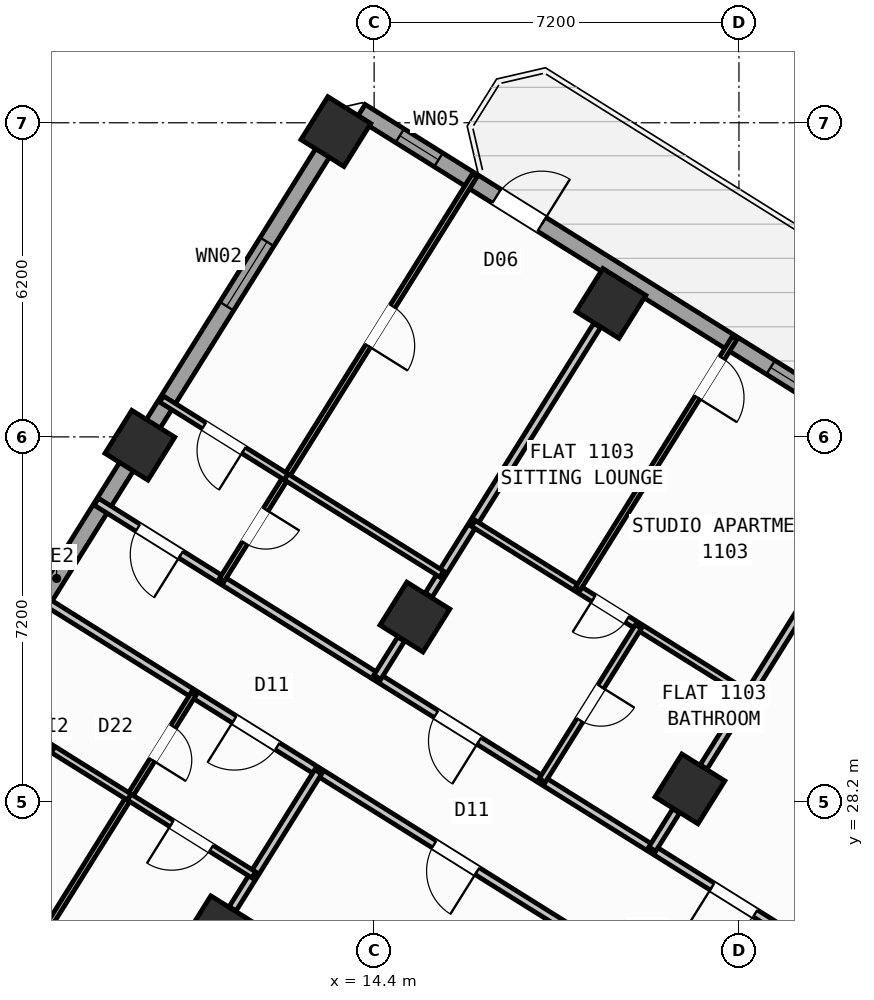
"""IFC4 building model, lengths in metres.
Left out: names, types, materials, properties, quantities, classifications, styles, units other than length and angle.
Written with IfcOpenShell. Run it as: python <this file> out.ifc"""

import sys

from ifc_helpers import new_model, si_unit, direction, frame, frame_2d, origin, origin_2d, place, context, subcontext, project, spatial, rectangle, hollow_rectangle, extrude, source, transform, mapped, element, fill, save


model = new_model("IFC4")
c1 = context("Model", 3, precision=1e-05, world=origin(), true_north=direction((0.0, 1.0)))
c2 = subcontext(c1, "Body", "Model", "MODEL_VIEW")
j1 = project(units=[si_unit("LENGTHUNIT", "METRE"), si_unit("PLANEANGLEUNIT", "RADIAN")], contexts=[c1])
p1 = place(None, origin())
s1 = spatial("IfcSite", under=j1, at=p1, CompositionType="ELEMENT")
p2 = place(p1, origin())
s2 = spatial("IfcBuilding", under=s1, at=p2, CompositionType="ELEMENT")
p3 = place(p2, frame((0.0, 0.0, 45.6)))
s3 = spatial("IfcBuildingStorey", under=s2, at=p3, CompositionType="ELEMENT", Elevation=45.6)
m1 = source(origin(), c2, "Body", "SweptSolid", [
    extrude(hollow_rectangle(XDim=1.0, YDim=1.0, WallThickness=0.04, at=origin_2d()), origin(), (0.0, 0.0, 1.0), 3.6),
])
for number, where, z_axis, x_axis in (
    (1, (20.632, 28.452, 0.0), (0.0, 0.0, 1.0), (-0.848, 0.53, 0.0)),
    (2, (19.073, 38.034, 0.0), (0.0, 0.0, 1.0), (-0.848, 0.53, 0.0)),
    (3, (15.205, 31.844, 0.0), (0.0, 0.0, 1.0), (-0.848, 0.53, 0.0)),
    (4, (11.336, 25.653, 0.0), (0.0, 0.0, 1.0), (-0.848, 0.53, 0.0)),
    (5, (13.646, 41.426, 0.0), (0.0, 0.0, 1.0), (-0.848, 0.53, 0.0)),
    (6, (9.777, 35.235, 0.0), (0.0, 0.0, 1.0), (-0.848, 0.53, 0.0)),
):
    element("IfcColumn", number, at=place(p3, frame(where, z_axis=z_axis, x_axis=x_axis)), inside=s3, PredefinedType="COLUMN", context=c2, shape_type="MappedRepresentation", body=[
        mapped(m1, transform((0.0, 0.0, 0.0), scale=1.0)),
    ])
p4 = place(p3, frame((2.415, 23.452, 0.0), z_axis=(0.0, 0.0, 1.0), x_axis=(0.52991049553, 0.848053575387, 0.0)))
e7 = element("IfcWall", 7, at=p4, inside=s3, PredefinedType="STANDARD", context=c2, shape_type="SweptSolid", body=[
    extrude(rectangle(XDim=21.587, YDim=0.32, at=frame_2d((10.794, 0.0))), origin(), (0.0, 0.0, 1.0), 2.725),
])
p5 = place(p4, frame((2.356, 0.0, 0.8)))
e8 = element("IfcOpeningElement", 8, at=p5, cuts=e7, PredefinedType="OPENING", context=c2, shape_type="SweptSolid", body=[
    extrude(rectangle(XDim=2.1, YDim=1.55, at=frame_2d((1.05, 0.775))), frame((0.0, 0.17, 0.0), z_axis=(0.0, -1.0, 0.0), x_axis=(1.0, 0.0, 0.0)), (0.0, 0.0, 1.0), 0.34),
])
p6 = place(p4, frame((8.639, 0.0, 1.0)))
e9 = element("IfcOpeningElement", 9, at=p6, cuts=e7, PredefinedType="OPENING", context=c2, shape_type="SweptSolid", body=[
    extrude(rectangle(XDim=0.9, YDim=1.25, at=frame_2d((0.45, 0.625))), frame((0.0, 0.17, 0.0), z_axis=(0.0, -1.0, 0.0), x_axis=(1.0, 0.0, 0.0)), (0.0, 0.0, 1.0), 0.34),
])
p7 = place(p4, frame((17.129, 0.0, 0.85)))
e10 = element("IfcOpeningElement", 10, at=p7, cuts=e7, PredefinedType="OPENING", context=c2, shape_type="SweptSolid", body=[
    extrude(rectangle(XDim=1.5, YDim=1.5, at=frame_2d((0.75, 0.75))), frame((0.0, 0.17, 0.0), z_axis=(0.0, -1.0, 0.0), x_axis=(1.0, 0.0, 0.0)), (0.0, 0.0, 1.0), 0.34),
])
p8 = place(p3, frame((14.138, 41.825, 0.0), z_axis=(0.0, 0.0, 1.0), x_axis=(0.848046498049, -0.529921821731, 0.0)))
e11 = element("IfcWall", 11, at=p8, inside=s3, PredefinedType="STANDARD", context=c2, shape_type="SweptSolid", body=[
    extrude(rectangle(XDim=31.588, YDim=0.32, at=frame_2d((15.794, 0.0))), origin(), (0.0, 0.0, 1.0), 3.35),
])
p9 = place(p8, frame((3.159, 0.0, 0.0)))
e12 = element("IfcOpeningElement", 12, at=p9, cuts=e11, PredefinedType="OPENING", context=c2, shape_type="SweptSolid", body=[
    extrude(rectangle(XDim=1.05, YDim=2.15, at=frame_2d((0.525, 1.075))), frame((0.0, 0.17, 0.0), z_axis=(0.0, -1.0, 0.0), x_axis=(1.0, 0.0, 0.0)), (0.0, 0.0, 1.0), 0.34),
])
p10 = place(p8, frame((0.906, 0.0, 1.0)))
e13 = element("IfcOpeningElement", 13, at=p10, cuts=e11, PredefinedType="OPENING", context=c2, shape_type="SweptSolid", body=[
    extrude(rectangle(XDim=0.9, YDim=1.25, at=frame_2d((0.45, 0.625))), frame((0.0, 0.17, 0.0), z_axis=(0.0, -1.0, 0.0), x_axis=(1.0, 0.0, 0.0)), (0.0, 0.0, 1.0), 0.34),
])
p11 = place(p8, frame((9.537, 0.0, 0.85)))
e14 = element("IfcOpeningElement", 14, at=p11, cuts=e11, PredefinedType="OPENING", context=c2, shape_type="SweptSolid", body=[
    extrude(rectangle(XDim=1.8, YDim=1.5, at=frame_2d((0.9, 0.75))), frame((0.0, 0.17, 0.0), z_axis=(0.0, -1.0, 0.0), x_axis=(1.0, 0.0, 0.0)), (0.0, 0.0, 1.0), 0.34),
])
p12 = place(p8, frame((13.899, 0.0, 0.85)))
e15 = element("IfcOpeningElement", 15, at=p12, cuts=e11, PredefinedType="OPENING", context=c2, shape_type="SweptSolid", body=[
    extrude(rectangle(XDim=1.5, YDim=1.5, at=frame_2d((0.75, 0.75))), frame((0.0, 0.17, 0.0), z_axis=(0.0, -1.0, 0.0), x_axis=(1.0, 0.0, 0.0)), (0.0, 0.0, 1.0), 0.34),
])
p13 = place(p8, frame((22.019, 0.0, 0.95)))
e16 = element("IfcOpeningElement", 16, at=p13, cuts=e11, PredefinedType="OPENING", context=c2, shape_type="SweptSolid", body=[
    extrude(rectangle(XDim=1.2, YDim=1.4, at=frame_2d((0.6, 0.7))), frame((0.0, 0.17, 0.0), z_axis=(0.0, -1.0, 0.0), x_axis=(1.0, 0.0, 0.0)), (0.0, 0.0, 1.0), 0.34),
])
p14 = place(p8, frame((27.569, 0.0, 0.95)))
e17 = element("IfcOpeningElement", 17, at=p14, cuts=e11, PredefinedType="OPENING", context=c2, shape_type="SweptSolid", body=[
    extrude(rectangle(XDim=1.2, YDim=1.4, at=frame_2d((0.6, 0.7))), frame((0.0, 0.17, 0.0), z_axis=(0.0, -1.0, 0.0), x_axis=(1.0, 0.0, 0.0)), (0.0, 0.0, 1.0), 0.34),
])
p15 = place(p3, frame((23.104, 25.256, 0.0), z_axis=(0.0, 0.0, 1.0), x_axis=(-0.848041752158, 0.529929416617, 0.0)))
e18 = element("IfcWall", 18, at=p15, inside=s3, PredefinedType="PARTITIONING", context=c2, shape_type="SweptSolid", body=[
    extrude(rectangle(XDim=16.73, YDim=0.16, at=frame_2d((8.365, 0.0))), origin(), (0.0, 0.0, 1.0), 3.34),
])
p16 = place(p15, frame((1.395, 0.0, 0.0)))
e19 = element("IfcOpeningElement", 19, at=p16, cuts=e18, PredefinedType="OPENING", context=c2, shape_type="SweptSolid", body=[
    extrude(rectangle(XDim=1.0, YDim=2.1, at=frame_2d((0.5, 1.05))), frame((0.0, 0.09, 0.0), z_axis=(0.0, -1.0, 0.0), x_axis=(1.0, 0.0, 0.0)), (0.0, 0.0, 1.0), 0.18),
])
p17 = place(p15, frame((7.82, 0.0, 0.0)))
e20 = element("IfcOpeningElement", 20, at=p17, cuts=e18, PredefinedType="OPENING", context=c2, shape_type="SweptSolid", body=[
    extrude(rectangle(XDim=1.0, YDim=2.1, at=frame_2d((0.5, 1.05))), frame((0.0, 0.09, 0.0), z_axis=(0.0, -1.0, 0.0), x_axis=(1.0, 0.0, 0.0)), (0.0, 0.0, 1.0), 0.18),
])
p18 = place(p15, frame((14.76, 0.0, 0.0)))
e21 = element("IfcOpeningElement", 21, at=p18, cuts=e18, PredefinedType="OPENING", context=c2, shape_type="SweptSolid", body=[
    extrude(rectangle(XDim=1.0, YDim=2.1, at=frame_2d((0.5, 1.05))), frame((0.0, 0.09, 0.0), z_axis=(0.0, -1.0, 0.0), x_axis=(1.0, 0.0, 0.0)), (0.0, 0.0, 1.0), 0.18),
])
p19 = place(p3, frame((21.938, 23.391, 0.0), z_axis=(0.0, 0.0, 1.0), x_axis=(-0.848045850158, 0.529922858565, 0.0)))
e22 = element("IfcWall", 22, at=p19, inside=s3, PredefinedType="PARTITIONING", context=c2, shape_type="SweptSolid", body=[
    extrude(rectangle(XDim=16.73, YDim=0.16, at=frame_2d((8.365, 0.0))), origin(), (0.0, 0.0, 1.0), 3.34),
])
p20 = place(p19, frame((2.22, 0.0, 0.0)))
e23 = element("IfcOpeningElement", 23, at=p20, cuts=e22, PredefinedType="OPENING", context=c2, shape_type="SweptSolid", body=[
    extrude(rectangle(XDim=0.86, YDim=2.05, at=frame_2d((0.43, 1.025))), frame((0.0, 0.09, 0.0), z_axis=(0.0, -1.0, 0.0), x_axis=(1.0, 0.0, 0.0)), (0.0, 0.0, 1.0), 0.18),
])
p21 = place(p19, frame((6.49, 0.0, 0.0)))
e24 = element("IfcOpeningElement", 24, at=p21, cuts=e22, PredefinedType="OPENING", context=c2, shape_type="SweptSolid", body=[
    extrude(rectangle(XDim=1.0, YDim=2.1, at=frame_2d((0.5, 1.05))), frame((0.0, 0.09, 0.0), z_axis=(0.0, -1.0, 0.0), x_axis=(1.0, 0.0, 0.0)), (0.0, 0.0, 1.0), 0.18),
])
p22 = place(p19, frame((11.14, 0.0, 0.0)))
e25 = element("IfcOpeningElement", 25, at=p22, cuts=e22, PredefinedType="OPENING", context=c2, shape_type="SweptSolid", body=[
    extrude(rectangle(XDim=1.0, YDim=2.1, at=frame_2d((0.5, 1.05))), frame((0.0, 0.09, 0.0), z_axis=(0.0, -1.0, 0.0), x_axis=(1.0, 0.0, 0.0)), (0.0, 0.0, 1.0), 0.18),
])
p23 = place(p3, frame((13.297, 28.791, 0.0), z_axis=(0.0, 0.0, 1.0), x_axis=(-0.529930102756, -0.848041323399, 0.0)))
e26 = element("IfcWall", 26, at=p23, inside=s3, PredefinedType="PARTITIONING", context=c2, shape_type="SweptSolid", body=[
    extrude(rectangle(XDim=3.188, YDim=0.16, at=frame_2d((1.594, 0.0))), origin(), (0.0, 0.0, 1.0), 2.725),
])
p24 = place(p3, frame((10.837, 30.327, 0.0), z_axis=(0.0, 0.0, 1.0), x_axis=(-0.529912148489, -0.848052542525, 0.0)))
e27 = element("IfcWall", 27, at=p24, inside=s3, PredefinedType="PARTITIONING", context=c2, shape_type="SweptSolid", body=[
    extrude(rectangle(XDim=10.62, YDim=0.11, at=frame_2d((5.31, 0.0))), origin(), (0.0, 0.0, 1.0), 3.34),
])
p25 = place(p24, frame((0.76, 0.0, 0.0)))
e28 = element("IfcOpeningElement", 28, at=p25, cuts=e27, PredefinedType="OPENING", context=c2, shape_type="SweptSolid", body=[
    extrude(rectangle(XDim=0.78, YDim=2.05, at=frame_2d((0.39, 1.025))), frame((0.0, 0.065, 0.0), z_axis=(0.0, -1.0, 0.0), x_axis=(1.0, 0.0, 0.0)), (0.0, 0.0, 1.0), 0.13),
])
p26 = place(p24, frame((6.05, 0.0, 0.0)))
e29 = element("IfcOpeningElement", 29, at=p26, cuts=e27, PredefinedType="OPENING", context=c2, shape_type="SweptSolid", body=[
    extrude(rectangle(XDim=0.92, YDim=2.08, at=frame_2d((0.46, 1.04))), frame((0.0, 0.065, 0.0), z_axis=(0.0, -1.0, 0.0), x_axis=(1.0, 0.0, 0.0)), (0.0, 0.0, 1.0), 0.13),
])
p27 = place(p3, frame((12.025, 26.755, 0.0), z_axis=(0.0, 0.0, 1.0), x_axis=(-0.848059786386, 0.529900555496, 0.0)))
e30 = element("IfcWall", 30, at=p27, inside=s3, PredefinedType="PLUMBINGWALL", context=c2, shape_type="SweptSolid", body=[
    extrude(rectangle(XDim=2.9, YDim=0.14, at=frame_2d((1.45, 0.0))), origin(), (0.0, 0.0, 1.0), 3.34),
])
p28 = place(p27, frame((0.99, 0.0, 0.0)))
e31 = element("IfcOpeningElement", 31, at=p28, cuts=e30, PredefinedType="OPENING", context=c2, shape_type="SweptSolid", body=[
    extrude(rectangle(XDim=0.92, YDim=2.08, at=frame_2d((0.46, 1.04))), frame((0.0, 0.08, 0.0), z_axis=(0.0, -1.0, 0.0), x_axis=(1.0, 0.0, 0.0)), (0.0, 0.0, 1.0), 0.16),
])
p29 = place(p3, frame((9.566, 28.292, 0.0), z_axis=(0.0, 0.0, 1.0), x_axis=(-0.848021036626, 0.529962566074, 0.0)))
e32 = element("IfcWall", 32, at=p29, inside=s3, PredefinedType="PLUMBINGWALL", context=c2, shape_type="SweptSolid", body=[
    extrude(rectangle(XDim=3.62, YDim=0.14, at=frame_2d((1.81, 0.0))), origin(), (0.0, 0.0, 1.0), 3.34),
])
p30 = place(p3, frame((24.229, 34.209, 0.0), z_axis=(0.0, 0.0, 1.0), x_axis=(-0.529897533635, -0.848061674554, 0.0)))
e33 = element("IfcWall", 33, at=p30, inside=s3, PredefinedType="PARTITIONING", context=c2, shape_type="SweptSolid", body=[
    extrude(rectangle(XDim=6.276, YDim=0.16, at=frame_2d((3.138, 0.0))), origin(), (0.0, 0.0, 1.0), 2.725),
])
p31 = place(p3, frame((20.361, 28.018, 0.0), z_axis=(0.0, 0.0, 1.0), x_axis=(-0.529900064649, -0.848060093086, 0.0)))
e34 = element("IfcWall", 34, at=p31, inside=s3, PredefinedType="PARTITIONING", context=c2, shape_type="SweptSolid", body=[
    extrude(rectangle(XDim=0.888, YDim=0.16, at=frame_2d((0.444, 0.0))), origin(), (0.0, 0.0, 1.0), 2.725),
])
p32 = place(p3, frame((18.802, 37.6, 0.0), z_axis=(0.0, 0.0, 1.0), x_axis=(-0.529915015264, -0.848050751193, 0.0)))
e35 = element("IfcWall", 35, at=p32, inside=s3, PredefinedType="PARTITIONING", context=c2, shape_type="SweptSolid", body=[
    extrude(rectangle(XDim=6.276, YDim=0.16, at=frame_2d((3.138, 0.0))), origin(), (0.0, 0.0, 1.0), 2.725),
])
p33 = place(p3, frame((14.933, 31.409, 0.0), z_axis=(0.0, 0.0, 1.0), x_axis=(-0.529776512202, -0.848137280821, 0.0)))
e36 = element("IfcWall", 36, at=p33, inside=s3, PredefinedType="PARTITIONING", context=c2, shape_type="SweptSolid", body=[
    extrude(rectangle(XDim=0.888, YDim=0.16, at=frame_2d((0.444, 0.0))), origin(), (0.0, 0.0, 1.0), 2.725),
])
p34 = place(p3, frame((21.787, 30.301, 0.0), z_axis=(0.0, 0.0, 1.0), x_axis=(-0.848049732085, 0.529916646191, 0.0)))
e37 = element("IfcWall", 37, at=p34, inside=s3, PredefinedType="PLUMBINGWALL", context=c2, shape_type="SweptSolid", body=[
    extrude(rectangle(XDim=6.4, YDim=0.14, at=frame_2d((3.2, 0.0))), origin(), (0.0, 0.0, 1.0), 3.34),
])
p35 = place(p34, frame((2.824, 0.0, 0.0)))
e38 = element("IfcOpeningElement", 38, at=p35, cuts=e37, PredefinedType="OPENING", context=c2, shape_type="SweptSolid", body=[
    extrude(rectangle(XDim=0.78, YDim=2.05, at=frame_2d((0.39, 1.025))), frame((0.0, 0.08, 0.0), z_axis=(0.0, -1.0, 0.0), x_axis=(1.0, 0.0, 0.0)), (0.0, 0.0, 1.0), 0.16),
])
p36 = place(p3, frame((19.616, 31.657, 0.0), z_axis=(0.0, 0.0, 1.0), x_axis=(-0.529876336437, -0.84807491891, 0.0)))
e39 = element("IfcWall", 39, at=p36, inside=s3, PredefinedType="PLUMBINGWALL", context=c2, shape_type="SweptSolid", body=[
    extrude(rectangle(XDim=3.58, YDim=0.14, at=frame_2d((1.79, 0.0))), origin(), (0.0, 0.0, 1.0), 3.34),
])
p37 = place(p36, frame((1.4, 0.0, 0.0)))
e40 = element("IfcOpeningElement", 40, at=p37, cuts=e39, PredefinedType="OPENING", context=c2, shape_type="SweptSolid", body=[
    extrude(rectangle(XDim=0.78, YDim=2.05, at=frame_2d((0.39, 1.025))), frame((0.0, 0.08, 0.0), z_axis=(0.0, -1.0, 0.0), x_axis=(1.0, 0.0, 0.0)), (0.0, 0.0, 1.0), 0.16),
])
p38 = place(p3, frame((21.517, 37.356, 0.0), z_axis=(0.0, 0.0, 1.0), x_axis=(-0.529916267533, -0.848049968695, 0.0)))
e41 = element("IfcWall", 41, at=p38, inside=s3, PredefinedType="PARTITIONING", context=c2, shape_type="SweptSolid", body=[
    extrude(rectangle(XDim=5.84, YDim=0.11, at=frame_2d((2.92, 0.0))), origin(), (0.0, 0.0, 1.0), 3.34),
])
p39 = place(p38, frame((0.47, 0.0, 0.0)))
e42 = element("IfcOpeningElement", 42, at=p39, cuts=e41, PredefinedType="OPENING", context=c2, shape_type="SweptSolid", body=[
    extrude(rectangle(XDim=0.92, YDim=2.08, at=frame_2d((0.46, 1.04))), frame((0.0, 0.065, 0.0), z_axis=(0.0, -1.0, 0.0), x_axis=(1.0, 0.0, 0.0)), (0.0, 0.0, 1.0), 0.13),
])
p40 = place(p3, frame((16.385, 40.563, 0.0), z_axis=(0.0, 0.0, 1.0), x_axis=(-0.529931378574, -0.848040526156, 0.0)))
e43 = element("IfcWall", 43, at=p40, inside=s3, PredefinedType="PARTITIONING", context=c2, shape_type="SweptSolid", body=[
    extrude(rectangle(XDim=9.42, YDim=0.11, at=frame_2d((4.71, 0.0))), origin(), (0.0, 0.0, 1.0), 3.34),
])
p41 = place(p40, frame((7.78, 0.0, 0.0)))
e44 = element("IfcOpeningElement", 44, at=p41, cuts=e43, PredefinedType="OPENING", context=c2, shape_type="SweptSolid", body=[
    extrude(rectangle(XDim=0.78, YDim=2.05, at=frame_2d((0.39, 1.025))), frame((0.0, 0.065, 0.0), z_axis=(0.0, -1.0, 0.0), x_axis=(1.0, 0.0, 0.0)), (0.0, 0.0, 1.0), 0.13),
])
p42 = place(p40, frame((3.05, 0.0, 0.0)))
e45 = element("IfcOpeningElement", 45, at=p42, cuts=e43, PredefinedType="OPENING", context=c2, shape_type="SweptSolid", body=[
    extrude(rectangle(XDim=0.92, YDim=2.08, at=frame_2d((0.46, 1.04))), frame((0.0, 0.065, 0.0), z_axis=(0.0, -1.0, 0.0), x_axis=(1.0, 0.0, 0.0)), (0.0, 0.0, 1.0), 0.13),
])
p43 = place(p3, frame((12.665, 34.61, 0.0), z_axis=(0.0, 0.0, 1.0), x_axis=(-0.848045593671, 0.529923269025, 0.0)))
e46 = element("IfcWall", 46, at=p43, inside=s3, PredefinedType="PLUMBINGWALL", context=c2, shape_type="SweptSolid", body=[
    extrude(rectangle(XDim=2.9, YDim=0.14, at=frame_2d((1.45, 0.0))), origin(), (0.0, 0.0, 1.0), 3.34),
])
p44 = place(p43, frame((0.99, 0.0, 0.0)))
e47 = element("IfcOpeningElement", 47, at=p44, cuts=e46, PredefinedType="OPENING", context=c2, shape_type="SweptSolid", body=[
    extrude(rectangle(XDim=0.92, YDim=2.08, at=frame_2d((0.46, 1.04))), frame((0.0, 0.08, 0.0), z_axis=(0.0, -1.0, 0.0), x_axis=(1.0, 0.0, 0.0)), (0.0, 0.0, 1.0), 0.16),
])
p45 = place(p3, frame((15.734, 32.692, 0.0), z_axis=(0.0, 0.0, 1.0), x_axis=(-0.848051346257, 0.52991406295, 0.0)))
e48 = element("IfcWall", 48, at=p45, inside=s3, PredefinedType="PLUMBINGWALL", context=c2, shape_type="SweptSolid", body=[
    extrude(rectangle(XDim=3.62, YDim=0.14, at=frame_2d((1.81, 0.0))), origin(), (0.0, 0.0, 1.0), 3.34),
])
m2 = source(origin(), c2, "Body", "SweptSolid", [
    extrude(rectangle(XDim=1.05, YDim=2.15, at=frame_2d((0.525, 1.075))), frame((0.0, 0.025, 0.0), z_axis=(0.0, -1.0, 0.0), x_axis=(1.0, 0.0, 0.0)), (0.0, 0.0, 1.0), 0.05),
])
p46 = place(p9, origin())
e49 = element("IfcDoor", 49, at=p46, inside=s3, OperationType="SINGLE_SWING_RIGHT", PredefinedType="DOOR", context=c2, shape_type="MappedRepresentation", body=[
    mapped(m2, transform((0.0, 0.0, 0.0), scale=1.0)),
])
fill(e12, e49)
m3 = source(origin(), c2, "Body", "SweptSolid", [
    extrude(rectangle(XDim=1.5, YDim=1.5, at=frame_2d((0.75, 0.75))), frame((0.0, 0.03, 0.0), z_axis=(0.0, -1.0, 0.0), x_axis=(1.0, 0.0, 0.0)), (0.0, 0.0, 1.0), 0.06),
])
p47 = place(p7, origin())
e50 = element("IfcWindow", 50, at=p47, inside=s3, PartitioningType="SINGLE_PANEL", PredefinedType="WINDOW", context=c2, shape_type="MappedRepresentation", body=[
    mapped(m3, transform((0.0, 0.0, 0.0), scale=1.0)),
])
fill(e10, e50)
m4 = source(origin(), c2, "Body", "SweptSolid", [
    extrude(rectangle(XDim=0.9, YDim=1.25, at=frame_2d((0.45, 0.625))), frame((0.0, 0.03, 0.0), z_axis=(0.0, -1.0, 0.0), x_axis=(1.0, 0.0, 0.0)), (0.0, 0.0, 1.0), 0.06),
])
p48 = place(p10, origin())
e51 = element("IfcWindow", 51, at=p48, inside=s3, PartitioningType="SINGLE_PANEL", PredefinedType="WINDOW", context=c2, shape_type="MappedRepresentation", body=[
    mapped(m4, transform((0.0, 0.0, 0.0), scale=1.0)),
])
fill(e13, e51)
m5 = source(origin(), c2, "Body", "SweptSolid", [
    extrude(rectangle(XDim=1.8, YDim=1.5, at=frame_2d((0.9, 0.75))), frame((0.0, 0.03, 0.0), z_axis=(0.0, -1.0, 0.0), x_axis=(1.0, 0.0, 0.0)), (0.0, 0.0, 1.0), 0.06),
])
p49 = place(p11, origin())
e52 = element("IfcWindow", 52, at=p49, inside=s3, PartitioningType="SINGLE_PANEL", PredefinedType="WINDOW", context=c2, shape_type="MappedRepresentation", body=[
    mapped(m5, transform((0.0, 0.0, 0.0), scale=1.0)),
])
fill(e14, e52)
m6 = source(origin(), c2, "Body", "SweptSolid", [
    extrude(rectangle(XDim=1.0, YDim=2.1, at=frame_2d((0.5, 1.05))), frame((0.0, 0.025, 0.0), z_axis=(0.0, -1.0, 0.0), x_axis=(1.0, 0.0, 0.0)), (0.0, 0.0, 1.0), 0.05),
])
p50 = place(p21, origin())
e53 = element("IfcDoor", 53, at=p50, inside=s3, OperationType="SINGLE_SWING_LEFT", PredefinedType="DOOR", context=c2, shape_type="MappedRepresentation", body=[
    mapped(m6, transform((0.0, 0.0, 0.0), scale=1.0)),
])
fill(e24, e53)
p51 = place(p22, origin())
e54 = element("IfcDoor", 54, at=p51, inside=s3, OperationType="SINGLE_SWING_RIGHT", PredefinedType="DOOR", context=c2, shape_type="MappedRepresentation", body=[
    mapped(m6, transform((0.0, 0.0, 0.0), scale=1.0)),
])
fill(e25, e54)
m7 = source(origin(), c2, "Body", "SweptSolid", [
    extrude(rectangle(XDim=0.92, YDim=2.08, at=frame_2d((0.46, 1.04))), frame((0.0, 0.025, 0.0), z_axis=(0.0, -1.0, 0.0), x_axis=(1.0, 0.0, 0.0)), (0.0, 0.0, 1.0), 0.05),
])
p52 = place(p28, origin())
e55 = element("IfcDoor", 55, at=p52, inside=s3, OperationType="SINGLE_SWING_RIGHT", PredefinedType="DOOR", context=c2, shape_type="MappedRepresentation", body=[
    mapped(m7, transform((0.0, 0.0, 0.0), scale=1.0)),
])
fill(e31, e55)
m8 = source(origin(), c2, "Body", "SweptSolid", [
    extrude(rectangle(XDim=0.78, YDim=2.05, at=frame_2d((0.39, 1.025))), frame((0.0, 0.025, 0.0), z_axis=(0.0, -1.0, 0.0), x_axis=(1.0, 0.0, 0.0)), (0.0, 0.0, 1.0), 0.05),
])
p53 = place(p25, origin())
e56 = element("IfcDoor", 56, at=p53, inside=s3, OperationType="SINGLE_SWING_RIGHT", PredefinedType="DOOR", context=c2, shape_type="MappedRepresentation", body=[
    mapped(m8, transform((0.0, 0.0, 0.0), scale=1.0)),
])
fill(e28, e56)
p54 = place(p16, origin())
e57 = element("IfcDoor", 57, at=p54, inside=s3, OperationType="SINGLE_SWING_RIGHT", PredefinedType="DOOR", context=c2, shape_type="MappedRepresentation", body=[
    mapped(m6, transform((0.0, 0.0, 0.0), scale=1.0)),
])
fill(e19, e57)
p55 = place(p39, origin())
e58 = element("IfcDoor", 58, at=p55, inside=s3, OperationType="SINGLE_SWING_RIGHT", PredefinedType="DOOR", context=c2, shape_type="MappedRepresentation", body=[
    mapped(m7, transform((0.0, 0.0, 0.0), scale=1.0)),
])
fill(e42, e58)
p56 = place(p17, origin())
e59 = element("IfcDoor", 59, at=p56, inside=s3, OperationType="SINGLE_SWING_LEFT", PredefinedType="DOOR", context=c2, shape_type="MappedRepresentation", body=[
    mapped(m6, transform((0.0, 0.0, 0.0), scale=1.0)),
])
fill(e20, e59)
p57 = place(p35, origin())
e60 = element("IfcDoor", 60, at=p57, inside=s3, OperationType="SINGLE_SWING_RIGHT", PredefinedType="DOOR", context=c2, shape_type="MappedRepresentation", body=[
    mapped(m8, transform((0.0, 0.0, 0.0), scale=1.0)),
])
fill(e38, e60)
p58 = place(p37, origin())
e61 = element("IfcDoor", 61, at=p58, inside=s3, OperationType="SINGLE_SWING_LEFT", PredefinedType="DOOR", context=c2, shape_type="MappedRepresentation", body=[
    mapped(m8, transform((0.0, 0.0, 0.0), scale=1.0)),
])
fill(e40, e61)
p59 = place(p18, origin())
e62 = element("IfcDoor", 62, at=p59, inside=s3, OperationType="SINGLE_SWING_LEFT", PredefinedType="DOOR", context=c2, shape_type="MappedRepresentation", body=[
    mapped(m6, transform((0.0, 0.0, 0.0), scale=1.0)),
])
fill(e21, e62)
p60 = place(p44, origin())
e63 = element("IfcDoor", 63, at=p60, inside=s3, OperationType="SINGLE_SWING_LEFT", PredefinedType="DOOR", context=c2, shape_type="MappedRepresentation", body=[
    mapped(m7, transform((0.0, 0.0, 0.0), scale=1.0)),
])
fill(e47, e63)
p61 = place(p41, origin())
e64 = element("IfcDoor", 64, at=p61, inside=s3, OperationType="SINGLE_SWING_LEFT", PredefinedType="DOOR", context=c2, shape_type="MappedRepresentation", body=[
    mapped(m8, transform((0.0, 0.0, 0.0), scale=1.0)),
])
fill(e44, e64)
p62 = place(p42, origin())
e65 = element("IfcDoor", 65, at=p62, inside=s3, OperationType="SINGLE_SWING_RIGHT", PredefinedType="DOOR", context=c2, shape_type="MappedRepresentation", body=[
    mapped(m7, transform((0.0, 0.0, 0.0), scale=1.0)),
])
fill(e45, e65)
save(model, sys.argv[1])
